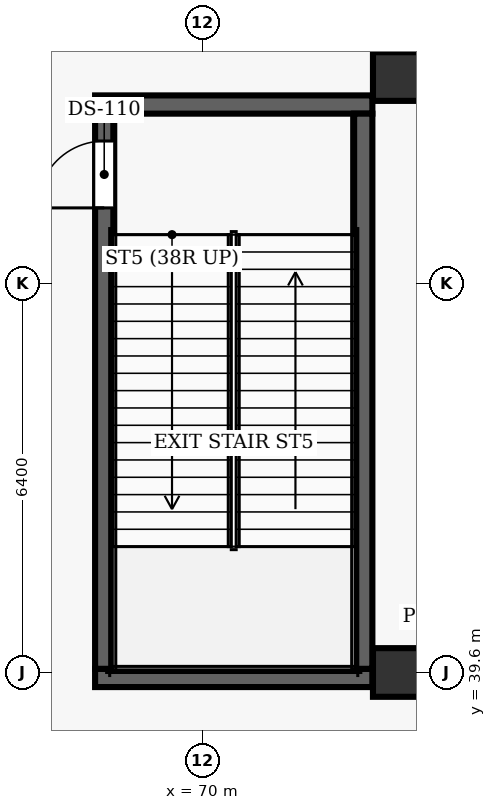
"""IFC4 building model, lengths in metres.
Left out: names, types, materials, properties, quantities, classifications, styles, units other than length and angle.
Written with IfcOpenShell. Run it as: python <this file> out.ifc"""

import sys

from ifc_helpers import new_model, si_unit, direction, frame, frame_2d, origin, origin_2d, place, context, subcontext, project, spatial, rectangle, extrude, element, fill, save


model = new_model("IFC4")
c1 = context("Model", 3, precision=1e-05, world=origin(), true_north=direction((0.0, 1.0)))
c2 = subcontext(c1, "Body", "Model", "MODEL_VIEW")
j1 = project(units=[si_unit("LENGTHUNIT", "METRE"), si_unit("PLANEANGLEUNIT", "RADIAN")], contexts=[c1])
p1 = place(None, origin())
s1 = spatial("IfcSite", under=j1, at=p1, CompositionType="ELEMENT")
p2 = place(p1, origin())
s2 = spatial("IfcBuilding", under=s1, at=p2, CompositionType="ELEMENT")
p3 = place(p2, frame((0.0, 0.0, 12.0)))
s3 = spatial("IfcBuildingStorey", under=s2, at=p3, CompositionType="ELEMENT", Elevation=12.0)
for number, where, z_axis, x_axis in (
    (1, (73.2, 39.6, 0.0), (0.0, 0.0, 1.0), (1.0, 0.0, 0.0)),
    (2, (73.2, 49.4, 0.0), (0.0, 0.0, 1.0), (1.0, 0.0, 0.0)),
):
    element("IfcColumn", number, at=place(p3, frame(where, z_axis=z_axis, x_axis=x_axis)), inside=s3, PredefinedType="COLUMN", context=c2, shape_type="SweptSolid", body=[
        extrude(rectangle(XDim=0.8, YDim=0.8, at=origin_2d()), origin(), (0.0, 0.0, 1.0), 6.6),
    ])
for number, where, z_axis, x_axis in (
    (3, (68.23, 39.51, 0.0), (0.0, 0.0, 1.0), (1.0, 0.0, 0.0)),
    (4, (68.23, 48.94, 0.0), (0.0, 0.0, 1.0), (1.0, 0.0, 0.0)),
):
    element("IfcWall", number, at=place(p3, frame(where, z_axis=z_axis, x_axis=x_axis)), inside=s3, PredefinedType="SHEAR", context=c2, shape_type="SweptSolid", body=[
        extrude(rectangle(XDim=4.56, YDim=0.3, at=frame_2d((2.28, 0.0))), origin(), (0.0, 0.0, 1.0), 6.6),
    ])
p4 = place(p3, frame((68.38, 39.66, 0.0), z_axis=(0.0, 0.0, 1.0), x_axis=(0.0, 1.0, 0.0)))
e5 = element("IfcWall", 5, at=p4, inside=s3, PredefinedType="SHEAR", context=c2, shape_type="SweptSolid", body=[
    extrude(rectangle(XDim=9.13, YDim=0.3, at=frame_2d((4.565, 0.0))), origin(), (0.0, 0.0, 1.0), 6.6),
])
p5 = place(p4, frame((7.58, 0.0, 0.0)))
e6 = element("IfcOpeningElement", 6, at=p5, cuts=e5, PredefinedType="OPENING", context=c2, shape_type="SweptSolid", body=[
    extrude(rectangle(XDim=1.1, YDim=2.15, at=frame_2d((0.55, 1.075))), frame((0.0, 0.16, 0.0), z_axis=(0.0, -1.0, 0.0), x_axis=(1.0, 0.0, 0.0)), (0.0, 0.0, 1.0), 0.32),
])
p6 = place(p3, frame((72.64, 48.79, 0.0), z_axis=(0.0, 0.0, 1.0), x_axis=(0.0, -1.0, 0.0)))
e7 = element("IfcWall", 7, at=p6, inside=s3, PredefinedType="SHEAR", context=c2, shape_type="SweptSolid", body=[
    extrude(rectangle(XDim=9.13, YDim=0.3, at=frame_2d((4.565, 0.0))), origin(), (0.0, 0.0, 1.0), 6.6),
])
p7 = place(p5, origin())
e8 = element("IfcDoor", 8, at=p7, inside=s3, OperationType="SINGLE_SWING_LEFT", PredefinedType="DOOR", context=c2, shape_type="SweptSolid", body=[
    extrude(rectangle(XDim=1.1, YDim=2.15, at=frame_2d((0.55, 1.075))), frame((0.0, 0.025, 0.0), z_axis=(0.0, -1.0, 0.0), x_axis=(1.0, 0.0, 0.0)), (0.0, 0.0, 1.0), 0.05),
])
fill(e6, e8)
save(model, sys.argv[1])
